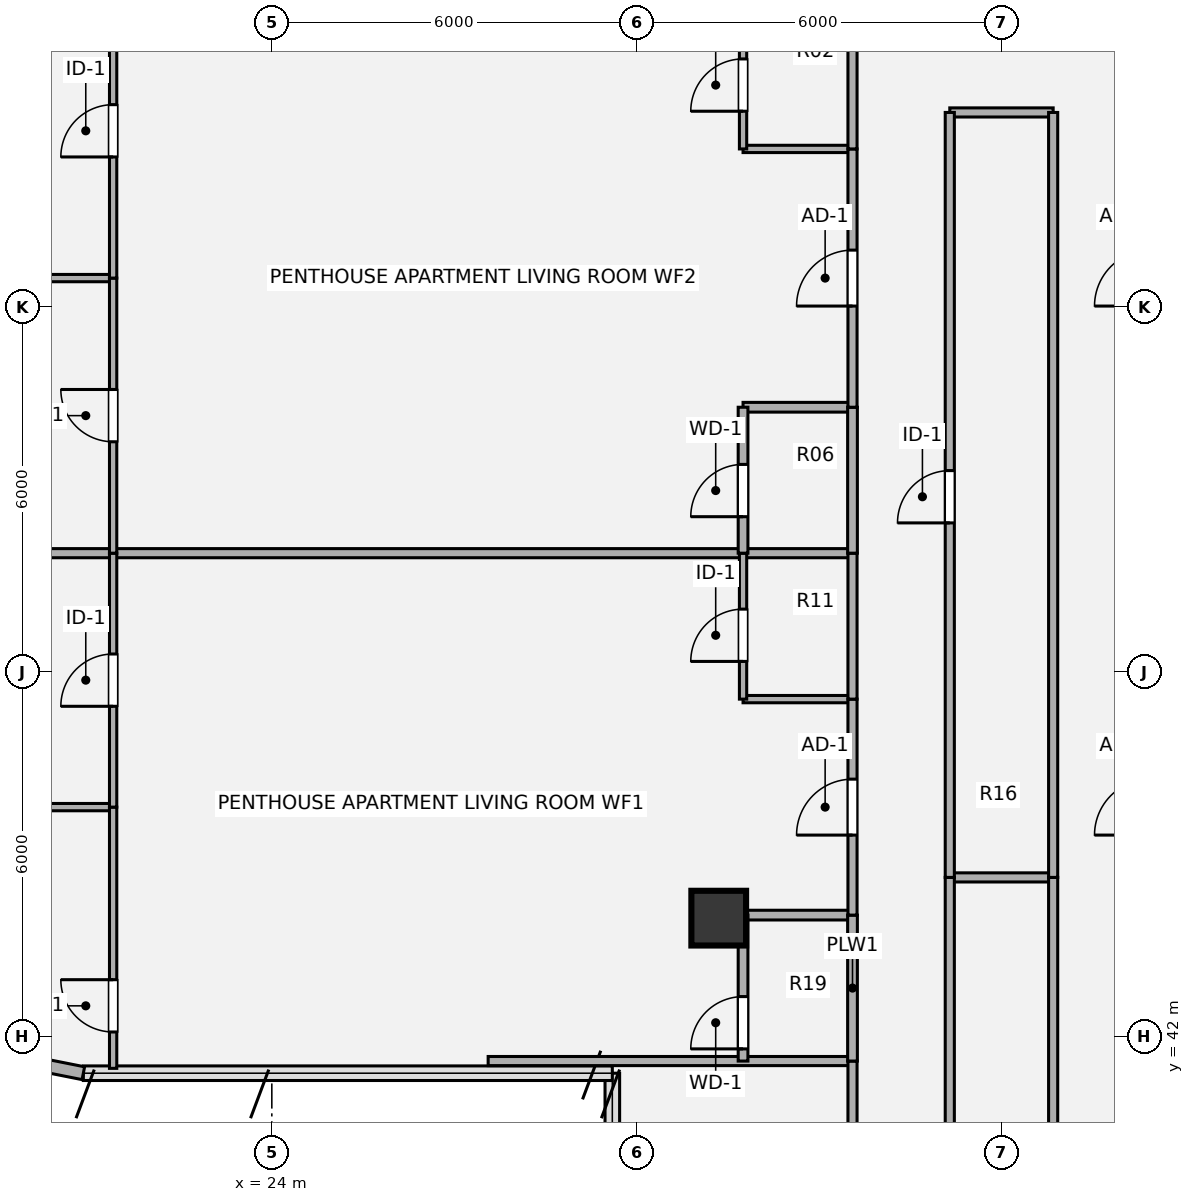
"""IFC4 building model, lengths in metres.
Left out: names, types, materials, properties, quantities, classifications, styles, units other than length and angle.
Written with IfcOpenShell. Run it as: python <this file> out.ifc"""

import sys

from ifc_helpers import new_model, si_unit, direction, frame, frame_2d, origin, origin_2d, place, context, subcontext, project, spatial, rectangle, hollow_circle, extrude, source, transform, mapped, element, fill, save


model = new_model("IFC4")
c1 = context("Model", 3, precision=1e-05, world=origin(), true_north=direction((0.0, 1.0)))
c2 = subcontext(c1, "Body", "Model", "MODEL_VIEW")
j1 = project(units=[si_unit("LENGTHUNIT", "METRE"), si_unit("PLANEANGLEUNIT", "RADIAN")], contexts=[c1])
p1 = place(None, origin())
s1 = spatial("IfcSite", under=j1, at=p1, CompositionType="ELEMENT")
p2 = place(p1, origin())
s2 = spatial("IfcBuilding", under=s1, at=p2, CompositionType="ELEMENT")
p3 = place(p2, frame((0.0, 0.0, 230.58)))
s3 = spatial("IfcBuildingStorey", under=s2, at=p3, CompositionType="ELEMENT", Elevation=230.58)
m1 = source(origin(), c2, "Body", "SweptSolid", [
    extrude(hollow_circle(Radius=0.45, WallThickness=0.032, at=origin_2d()), origin(), (0.0, 0.0, 1.0), 3.78),
])
p4 = place(p3, frame((31.35, 43.95, 0.0), z_axis=(0.0, 0.0, 1.0), x_axis=(1.0, 0.0, 0.0)))
e1 = element("IfcColumn", 1, at=p4, inside=s3, PredefinedType="COLUMN", context=c2, shape_type="MappedRepresentation", body=[
    mapped(m1, transform((0.0, 0.0, 0.0), x_axis=(1.0, 0.0, 0.0), y_axis=(0.0, 1.0, 0.0), z_axis=(0.0, 0.0, 1.0), scale=1.0)),
])
p5 = place(p3, frame((20.9, 41.4, 0.0), z_axis=(0.0, 0.0, 1.0), x_axis=(-0.980775717779, 0.195138390419, 0.0)))
e2 = element("IfcWall", 2, at=p5, inside=s3, PredefinedType="SOLIDWALL", context=c2, shape_type="SweptSolid", body=[
    extrude(rectangle(XDim=1.249, YDim=0.215, at=frame_2d((0.624, 0.0))), origin(), (0.0, 0.0, 1.0), 3.53),
])
p6 = place(p3, frame((27.558, 41.6, 0.0), z_axis=(0.0, 0.0, 1.0), x_axis=(1.0, 0.0, 0.0)))
e3 = element("IfcWall", 3, at=p6, inside=s3, PredefinedType="PARTITIONING", context=c2, shape_type="SweptSolid", body=[
    extrude(rectangle(XDim=5.992, YDim=0.15, at=frame_2d((2.996, 0.0))), origin(), (0.0, 0.0, 1.0), 3.5),
])
p7 = place(p3, frame((31.75, 44.0, 0.0), z_axis=(0.0, 0.0, 1.0), x_axis=(1.0, 0.0, 0.0)))
e4 = element("IfcWall", 4, at=p7, inside=s3, PredefinedType="PLUMBINGWALL", context=c2, shape_type="SweptSolid", body=[
    extrude(rectangle(XDim=1.8, YDim=0.16, at=frame_2d((0.9, 0.0))), origin(), (0.0, 0.0, 1.0), 2.903),
])
p8 = place(p3, frame((35.15, 44.62, 0.0), z_axis=(0.0, 0.0, 1.0), x_axis=(1.0, 0.0, 0.0)))
e5 = element("IfcWall", 5, at=p8, inside=s3, PredefinedType="PARTITIONING", context=c2, shape_type="SweptSolid", body=[
    extrude(rectangle(XDim=1.7, YDim=0.15, at=frame_2d((0.85, 0.0))), origin(), (0.0, 0.0, 1.0), 3.259),
])
p9 = place(p3, frame((17.78, 45.776, 0.0), z_axis=(0.0, 0.0, 1.0), x_axis=(1.0, 0.0, 0.0)))
e6 = element("IfcWall", 6, at=p9, inside=s3, PredefinedType="PARTITIONING", context=c2, shape_type="SweptSolid", body=[
    extrude(rectangle(XDim=3.61, YDim=0.12, at=frame_2d((1.805, 0.0))), origin(), (0.0, 0.0, 1.0), 2.982),
])
p10 = place(p3, frame((31.75, 47.552, 0.0), z_axis=(0.0, 0.0, 1.0), x_axis=(1.0, 0.0, 0.0)))
e7 = element("IfcWall", 7, at=p10, inside=s3, PredefinedType="PARTITIONING", context=c2, shape_type="SweptSolid", body=[
    extrude(rectangle(XDim=1.8, YDim=0.12, at=frame_2d((0.9, 0.0))), origin(), (0.0, 0.0, 1.0), 3.259),
])
p11 = place(p3, frame((17.78, 49.952, 0.0), z_axis=(0.0, 0.0, 1.0), x_axis=(1.0, 0.0, 0.0)))
e8 = element("IfcWall", 8, at=p11, inside=s3, PredefinedType="PARTITIONING", context=c2, shape_type="SweptSolid", body=[
    extrude(rectangle(XDim=15.77, YDim=0.15, at=frame_2d((7.885, 0.0))), origin(), (0.0, 0.0, 1.0), 2.982),
])
p12 = place(p3, frame((31.75, 52.352, 0.0), z_axis=(0.0, 0.0, 1.0), x_axis=(1.0, 0.0, 0.0)))
e9 = element("IfcWall", 9, at=p12, inside=s3, PredefinedType="PLUMBINGWALL", context=c2, shape_type="SweptSolid", body=[
    extrude(rectangle(XDim=1.8, YDim=0.16, at=frame_2d((0.9, 0.0))), origin(), (0.0, 0.0, 1.0), 3.259),
])
p13 = place(p3, frame((17.78, 54.476, 0.0), z_axis=(0.0, 0.0, 1.0), x_axis=(1.0, 0.0, 0.0)))
e10 = element("IfcWall", 10, at=p13, inside=s3, PredefinedType="PARTITIONING", context=c2, shape_type="SweptSolid", body=[
    extrude(rectangle(XDim=3.61, YDim=0.12, at=frame_2d((1.805, 0.0))), origin(), (0.0, 0.0, 1.0), 2.903),
])
p14 = place(p3, frame((31.75, 56.6, 0.0), z_axis=(0.0, 0.0, 1.0), x_axis=(1.0, 0.0, 0.0)))
e11 = element("IfcWall", 11, at=p14, inside=s3, PredefinedType="PARTITIONING", context=c2, shape_type="SweptSolid", body=[
    extrude(rectangle(XDim=1.8, YDim=0.12, at=frame_2d((0.9, 0.0))), origin(), (0.0, 0.0, 1.0), 3.259),
])
p15 = place(p3, frame((35.15, 57.2, 0.0), z_axis=(0.0, 0.0, 1.0), x_axis=(1.0, 0.0, 0.0)))
e12 = element("IfcWall", 12, at=p15, inside=s3, PredefinedType="PARTITIONING", context=c2, shape_type="SweptSolid", body=[
    extrude(rectangle(XDim=1.7, YDim=0.15, at=frame_2d((0.85, 0.0))), origin(), (0.0, 0.0, 1.0), 3.308),
])
p16 = place(p3, frame((21.39, 41.48, 0.0), z_axis=(0.0, 0.0, 1.0), x_axis=(0.0, 1.0, 0.0)))
e13 = element("IfcWall", 13, at=p16, inside=s3, PredefinedType="PARTITIONING", context=c2, shape_type="SweptSolid", body=[
    extrude(rectangle(XDim=4.296, YDim=0.12, at=frame_2d((2.148, 0.0))), origin(), (0.0, 0.0, 1.0), 3.5),
])
p17 = place(p16, frame((0.598, 0.0, 0.0)))
e14 = element("IfcOpeningElement", 14, at=p17, cuts=e13, PredefinedType="OPENING", context=c2, shape_type="SweptSolid", body=[
    extrude(rectangle(XDim=0.86, YDim=2.1, at=origin_2d()), frame((0.43, 0.07, 1.05), z_axis=(0.0, -1.0, 0.0), x_axis=(1.0, 0.0, 0.0)), (0.0, 0.0, 1.0), 0.14),
])
p18 = place(p3, frame((21.39, 45.776, 0.0), z_axis=(0.0, 0.0, 1.0), x_axis=(0.0, 1.0, 0.0)))
e15 = element("IfcWall", 15, at=p18, inside=s3, PredefinedType="PARTITIONING", context=c2, shape_type="SweptSolid", body=[
    extrude(rectangle(XDim=4.176, YDim=0.12, at=frame_2d((2.088, 0.0))), origin(), (0.0, 0.0, 1.0), 3.5),
])
p19 = place(p18, frame((1.658, 0.0, 0.0)))
e16 = element("IfcOpeningElement", 16, at=p19, cuts=e15, PredefinedType="OPENING", context=c2, shape_type="SweptSolid", body=[
    extrude(rectangle(XDim=0.86, YDim=2.1, at=origin_2d()), frame((0.43, 0.07, 1.05), z_axis=(0.0, -1.0, 0.0), x_axis=(1.0, 0.0, 0.0)), (0.0, 0.0, 1.0), 0.14),
])
p20 = place(p3, frame((21.39, 49.952, 0.0), z_axis=(0.0, 0.0, 1.0), x_axis=(0.0, 1.0, 0.0)))
e17 = element("IfcWall", 17, at=p20, inside=s3, PredefinedType="PARTITIONING", context=c2, shape_type="SweptSolid", body=[
    extrude(rectangle(XDim=4.524, YDim=0.12, at=frame_2d((2.262, 0.0))), origin(), (0.0, 0.0, 1.0), 3.5),
])
p21 = place(p20, frame((1.832, 0.0, 0.0)))
e18 = element("IfcOpeningElement", 18, at=p21, cuts=e17, PredefinedType="OPENING", context=c2, shape_type="SweptSolid", body=[
    extrude(rectangle(XDim=0.86, YDim=2.1, at=origin_2d()), frame((0.43, 0.07, 1.05), z_axis=(0.0, -1.0, 0.0), x_axis=(1.0, 0.0, 0.0)), (0.0, 0.0, 1.0), 0.14),
])
p22 = place(p3, frame((21.39, 54.476, 0.0), z_axis=(0.0, 0.0, 1.0), x_axis=(0.0, 1.0, 0.0)))
e19 = element("IfcWall", 19, at=p22, inside=s3, PredefinedType="PARTITIONING", context=c2, shape_type="SweptSolid", body=[
    extrude(rectangle(XDim=4.844, YDim=0.12, at=frame_2d((2.422, 0.0))), origin(), (0.0, 0.0, 1.0), 3.5),
])
p23 = place(p22, frame((1.992, 0.0, 0.0)))
e20 = element("IfcOpeningElement", 20, at=p23, cuts=e19, PredefinedType="OPENING", context=c2, shape_type="SweptSolid", body=[
    extrude(rectangle(XDim=0.86, YDim=2.1, at=origin_2d()), frame((0.43, 0.07, 1.05), z_axis=(0.0, -1.0, 0.0), x_axis=(1.0, 0.0, 0.0)), (0.0, 0.0, 1.0), 0.14),
])
p24 = place(p3, frame((31.75, 41.6, 0.0), z_axis=(0.0, 0.0, 1.0), x_axis=(0.0, 1.0, 0.0)))
e21 = element("IfcWall", 21, at=p24, inside=s3, PredefinedType="PLUMBINGWALL", context=c2, shape_type="SweptSolid", body=[
    extrude(rectangle(XDim=2.4, YDim=0.16, at=frame_2d((1.2, 0.0))), origin(), (0.0, 0.0, 1.0), 3.5),
])
p25 = place(p24, frame((0.2, 0.0, 0.0)))
e22 = element("IfcOpeningElement", 22, at=p25, cuts=e21, PredefinedType="OPENING", context=c2, shape_type="SweptSolid", body=[
    extrude(rectangle(XDim=0.86, YDim=2.1, at=origin_2d()), frame((0.43, 0.09, 1.05), z_axis=(0.0, -1.0, 0.0), x_axis=(1.0, 0.0, 0.0)), (0.0, 0.0, 1.0), 0.18),
])
p26 = place(p3, frame((31.75, 47.552, 0.0), z_axis=(0.0, 0.0, 1.0), x_axis=(0.0, 1.0, 0.0)))
e23 = element("IfcWall", 23, at=p26, inside=s3, PredefinedType="PARTITIONING", context=c2, shape_type="SweptSolid", body=[
    extrude(rectangle(XDim=2.4, YDim=0.12, at=frame_2d((1.2, 0.0))), origin(), (0.0, 0.0, 1.0), 3.5),
])
p27 = place(p26, frame((0.62, 0.0, 0.0)))
e24 = element("IfcOpeningElement", 24, at=p27, cuts=e23, PredefinedType="OPENING", context=c2, shape_type="SweptSolid", body=[
    extrude(rectangle(XDim=0.86, YDim=2.1, at=origin_2d()), frame((0.43, 0.07, 1.05), z_axis=(0.0, -1.0, 0.0), x_axis=(1.0, 0.0, 0.0)), (0.0, 0.0, 1.0), 0.14),
])
p28 = place(p3, frame((31.75, 49.952, 0.0), z_axis=(0.0, 0.0, 1.0), x_axis=(0.0, 1.0, 0.0)))
e25 = element("IfcWall", 25, at=p28, inside=s3, PredefinedType="PLUMBINGWALL", context=c2, shape_type="SweptSolid", body=[
    extrude(rectangle(XDim=2.4, YDim=0.16, at=frame_2d((1.2, 0.0))), origin(), (0.0, 0.0, 1.0), 3.5),
])
p29 = place(p28, frame((0.6, 0.0, 0.0)))
e26 = element("IfcOpeningElement", 26, at=p29, cuts=e25, PredefinedType="OPENING", context=c2, shape_type="SweptSolid", body=[
    extrude(rectangle(XDim=0.86, YDim=2.1, at=origin_2d()), frame((0.43, 0.09, 1.05), z_axis=(0.0, -1.0, 0.0), x_axis=(1.0, 0.0, 0.0)), (0.0, 0.0, 1.0), 0.18),
])
p30 = place(p3, frame((31.75, 56.6, 0.0), z_axis=(0.0, 0.0, 1.0), x_axis=(0.0, 1.0, 0.0)))
e27 = element("IfcWall", 27, at=p30, inside=s3, PredefinedType="PARTITIONING", context=c2, shape_type="SweptSolid", body=[
    extrude(rectangle(XDim=2.4, YDim=0.12, at=frame_2d((1.2, 0.0))), origin(), (0.0, 0.0, 1.0), 3.5),
])
p31 = place(p30, frame((0.62, 0.0, 0.0)))
e28 = element("IfcOpeningElement", 28, at=p31, cuts=e27, PredefinedType="OPENING", context=c2, shape_type="SweptSolid", body=[
    extrude(rectangle(XDim=0.86, YDim=2.1, at=origin_2d()), frame((0.43, 0.07, 1.05), z_axis=(0.0, -1.0, 0.0), x_axis=(1.0, 0.0, 0.0)), (0.0, 0.0, 1.0), 0.14),
])
p32 = place(p3, frame((33.55, 21.2, 0.0), z_axis=(0.0, 0.0, 1.0), x_axis=(0.0, 1.0, 0.0)))
e29 = element("IfcWall", 29, at=p32, inside=s3, PredefinedType="PARTITIONING", context=c2, shape_type="SweptSolid", body=[
    extrude(rectangle(XDim=20.4, YDim=0.15, at=frame_2d((10.2, 0.0))), origin(), (0.0, 0.0, 1.0), 3.5),
])
p33 = place(p32, frame((9.64, 0.0, 0.0)))
e30 = element("IfcOpeningElement", 30, at=p33, cuts=e29, PredefinedType="OPENING", context=c2, shape_type="SweptSolid", body=[
    extrude(rectangle(XDim=0.86, YDim=2.1, at=origin_2d()), frame((0.43, 0.085, 1.05), z_axis=(0.0, -1.0, 0.0), x_axis=(1.0, 0.0, 0.0)), (0.0, 0.0, 1.0), 0.17),
])
p34 = place(p3, frame((33.55, 41.6, 0.0), z_axis=(0.0, 0.0, 1.0), x_axis=(0.0, 1.0, 0.0)))
e31 = element("IfcWall", 31, at=p34, inside=s3, PredefinedType="PLUMBINGWALL", context=c2, shape_type="SweptSolid", body=[
    extrude(rectangle(XDim=2.4, YDim=0.16, at=frame_2d((1.2, 0.0))), origin(), (0.0, 0.0, 1.0), 3.5),
])
p35 = place(p3, frame((33.55, 44.0, 0.0), z_axis=(0.0, 0.0, 1.0), x_axis=(0.0, 1.0, 0.0)))
e32 = element("IfcWall", 32, at=p35, inside=s3, PredefinedType="PARTITIONING", context=c2, shape_type="SweptSolid", body=[
    extrude(rectangle(XDim=3.552, YDim=0.15, at=frame_2d((1.776, 0.0))), origin(), (0.0, 0.0, 1.0), 3.5),
])
p36 = place(p35, frame((1.316, 0.0, 0.0)))
e33 = element("IfcOpeningElement", 33, at=p36, cuts=e32, PredefinedType="OPENING", context=c2, shape_type="SweptSolid", body=[
    extrude(rectangle(XDim=0.92, YDim=2.1, at=origin_2d()), frame((0.46, 0.085, 1.05), z_axis=(0.0, -1.0, 0.0), x_axis=(1.0, 0.0, 0.0)), (0.0, 0.0, 1.0), 0.17),
])
p37 = place(p3, frame((33.55, 47.552, 0.0), z_axis=(0.0, 0.0, 1.0), x_axis=(0.0, 1.0, 0.0)))
e34 = element("IfcWall", 34, at=p37, inside=s3, PredefinedType="PARTITIONING", context=c2, shape_type="SweptSolid", body=[
    extrude(rectangle(XDim=2.4, YDim=0.15, at=frame_2d((1.2, 0.0))), origin(), (0.0, 0.0, 1.0), 3.5),
])
p38 = place(p3, frame((33.55, 49.952, 0.0), z_axis=(0.0, 0.0, 1.0), x_axis=(0.0, 1.0, 0.0)))
e35 = element("IfcWall", 35, at=p38, inside=s3, PredefinedType="PLUMBINGWALL", context=c2, shape_type="SweptSolid", body=[
    extrude(rectangle(XDim=2.4, YDim=0.16, at=frame_2d((1.2, 0.0))), origin(), (0.0, 0.0, 1.0), 3.5),
])
p39 = place(p3, frame((33.55, 52.352, 0.0), z_axis=(0.0, 0.0, 1.0), x_axis=(0.0, 1.0, 0.0)))
e36 = element("IfcWall", 36, at=p39, inside=s3, PredefinedType="PARTITIONING", context=c2, shape_type="SweptSolid", body=[
    extrude(rectangle(XDim=4.248, YDim=0.15, at=frame_2d((2.124, 0.0))), origin(), (0.0, 0.0, 1.0), 3.5),
])
p40 = place(p39, frame((1.664, 0.0, 0.0)))
e37 = element("IfcOpeningElement", 37, at=p40, cuts=e36, PredefinedType="OPENING", context=c2, shape_type="SweptSolid", body=[
    extrude(rectangle(XDim=0.92, YDim=2.1, at=origin_2d()), frame((0.46, 0.085, 1.05), z_axis=(0.0, -1.0, 0.0), x_axis=(1.0, 0.0, 0.0)), (0.0, 0.0, 1.0), 0.17),
])
p41 = place(p3, frame((33.55, 56.6, 0.0), z_axis=(0.0, 0.0, 1.0), x_axis=(0.0, 1.0, 0.0)))
e38 = element("IfcWall", 38, at=p41, inside=s3, PredefinedType="PARTITIONING", context=c2, shape_type="SweptSolid", body=[
    extrude(rectangle(XDim=2.4, YDim=0.15, at=frame_2d((1.2, 0.0))), origin(), (0.0, 0.0, 1.0), 3.5),
])
p42 = place(p3, frame((35.15, 25.2, 0.0), z_axis=(0.0, 0.0, 1.0), x_axis=(0.0, 1.0, 0.0)))
e39 = element("IfcWall", 39, at=p42, inside=s3, PredefinedType="PARTITIONING", context=c2, shape_type="SweptSolid", body=[
    extrude(rectangle(XDim=19.42, YDim=0.15, at=frame_2d((9.71, 0.0))), origin(), (0.0, 0.0, 1.0), 3.5),
])
p43 = place(p3, frame((35.15, 44.62, 0.0), z_axis=(0.0, 0.0, 1.0), x_axis=(0.0, 1.0, 0.0)))
e40 = element("IfcWall", 40, at=p43, inside=s3, PredefinedType="PARTITIONING", context=c2, shape_type="SweptSolid", body=[
    extrude(rectangle(XDim=12.58, YDim=0.15, at=frame_2d((6.29, 0.0))), origin(), (0.0, 0.0, 1.0), 3.5),
])
p44 = place(p43, frame((5.83, 0.0, 0.0)))
e41 = element("IfcOpeningElement", 41, at=p44, cuts=e40, PredefinedType="OPENING", context=c2, shape_type="SweptSolid", body=[
    extrude(rectangle(XDim=0.86, YDim=2.1, at=origin_2d()), frame((0.43, 0.085, 1.05), z_axis=(0.0, -1.0, 0.0), x_axis=(1.0, 0.0, 0.0)), (0.0, 0.0, 1.0), 0.17),
])
p45 = place(p3, frame((36.85, 25.2, 0.0), z_axis=(0.0, 0.0, 1.0), x_axis=(0.0, 1.0, 0.0)))
e42 = element("IfcWall", 42, at=p45, inside=s3, PredefinedType="PARTITIONING", context=c2, shape_type="SweptSolid", body=[
    extrude(rectangle(XDim=19.42, YDim=0.15, at=frame_2d((9.71, 0.0))), origin(), (0.0, 0.0, 1.0), 3.5),
])
p46 = place(p45, frame((9.185, 0.0, 0.0)))
e43 = element("IfcOpeningElement", 43, at=p46, cuts=e42, PredefinedType="OPENING", context=c2, shape_type="SweptSolid", body=[
    extrude(rectangle(XDim=1.05, YDim=2.1, at=origin_2d()), frame((0.525, 0.085, 1.05), z_axis=(0.0, -1.0, 0.0), x_axis=(1.0, 0.0, 0.0)), (0.0, 0.0, 1.0), 0.17),
])
p47 = place(p3, frame((36.85, 44.62, 0.0), z_axis=(0.0, 0.0, 1.0), x_axis=(0.0, 1.0, 0.0)))
e44 = element("IfcWall", 44, at=p47, inside=s3, PredefinedType="PARTITIONING", context=c2, shape_type="SweptSolid", body=[
    extrude(rectangle(XDim=12.58, YDim=0.15, at=frame_2d((6.29, 0.0))), origin(), (0.0, 0.0, 1.0), 3.5),
])
m2 = source(origin(), c2, "Body", "SweptSolid", [
    extrude(rectangle(XDim=0.86, YDim=2.1, at=origin_2d()), frame((0.43, 0.025, 1.05), z_axis=(0.0, -1.0, 0.0), x_axis=(1.0, 0.0, 0.0)), (0.0, 0.0, 1.0), 0.05),
])
p48 = place(p17, origin())
e45 = element("IfcDoor", 45, at=p48, inside=s3, OperationType="SINGLE_SWING_RIGHT", PredefinedType="DOOR", context=c2, shape_type="MappedRepresentation", body=[
    mapped(m2, transform((0.0, 0.0, 0.0), x_axis=(1.0, 0.0, 0.0), y_axis=(0.0, 1.0, 0.0), z_axis=(0.0, 0.0, 1.0), scale=1.0)),
])
fill(e14, e45)
p49 = place(p19, origin())
e46 = element("IfcDoor", 46, at=p49, inside=s3, OperationType="SINGLE_SWING_LEFT", PredefinedType="DOOR", context=c2, shape_type="MappedRepresentation", body=[
    mapped(m2, transform((0.0, 0.0, 0.0), x_axis=(1.0, 0.0, 0.0), y_axis=(0.0, 1.0, 0.0), z_axis=(0.0, 0.0, 1.0), scale=1.0)),
])
fill(e16, e46)
p50 = place(p21, origin())
e47 = element("IfcDoor", 47, at=p50, inside=s3, OperationType="SINGLE_SWING_RIGHT", PredefinedType="DOOR", context=c2, shape_type="MappedRepresentation", body=[
    mapped(m2, transform((0.0, 0.0, 0.0), x_axis=(1.0, 0.0, 0.0), y_axis=(0.0, 1.0, 0.0), z_axis=(0.0, 0.0, 1.0), scale=1.0)),
])
fill(e18, e47)
p51 = place(p23, origin())
e48 = element("IfcDoor", 48, at=p51, inside=s3, OperationType="SINGLE_SWING_LEFT", PredefinedType="DOOR", context=c2, shape_type="MappedRepresentation", body=[
    mapped(m2, transform((0.0, 0.0, 0.0), x_axis=(1.0, 0.0, 0.0), y_axis=(0.0, 1.0, 0.0), z_axis=(0.0, 0.0, 1.0), scale=1.0)),
])
fill(e20, e48)
m3 = source(origin(), c2, "Body", "SweptSolid", [
    extrude(rectangle(XDim=0.86, YDim=2.1, at=origin_2d()), frame((0.43, 0.025, 1.05), z_axis=(0.0, -1.0, 0.0), x_axis=(1.0, 0.0, 0.0)), (0.0, 0.0, 1.0), 0.05),
])
p52 = place(p25, origin())
e49 = element("IfcDoor", 49, at=p52, inside=s3, OperationType="SINGLE_SWING_LEFT", PredefinedType="DOOR", context=c2, shape_type="MappedRepresentation", body=[
    mapped(m3, transform((0.0, 0.0, 0.0), x_axis=(1.0, 0.0, 0.0), y_axis=(0.0, 1.0, 0.0), z_axis=(0.0, 0.0, 1.0), scale=1.0)),
])
fill(e22, e49)
p53 = place(p27, origin())
e50 = element("IfcDoor", 50, at=p53, inside=s3, OperationType="SINGLE_SWING_LEFT", PredefinedType="DOOR", context=c2, shape_type="MappedRepresentation", body=[
    mapped(m2, transform((0.0, 0.0, 0.0), x_axis=(1.0, 0.0, 0.0), y_axis=(0.0, 1.0, 0.0), z_axis=(0.0, 0.0, 1.0), scale=1.0)),
])
fill(e24, e50)
p54 = place(p29, origin())
e51 = element("IfcDoor", 51, at=p54, inside=s3, OperationType="SINGLE_SWING_LEFT", PredefinedType="DOOR", context=c2, shape_type="MappedRepresentation", body=[
    mapped(m3, transform((0.0, 0.0, 0.0), x_axis=(1.0, 0.0, 0.0), y_axis=(0.0, 1.0, 0.0), z_axis=(0.0, 0.0, 1.0), scale=1.0)),
])
fill(e26, e51)
p55 = place(p31, origin())
e52 = element("IfcDoor", 52, at=p55, inside=s3, OperationType="SINGLE_SWING_LEFT", PredefinedType="DOOR", context=c2, shape_type="MappedRepresentation", body=[
    mapped(m2, transform((0.0, 0.0, 0.0), x_axis=(1.0, 0.0, 0.0), y_axis=(0.0, 1.0, 0.0), z_axis=(0.0, 0.0, 1.0), scale=1.0)),
])
fill(e28, e52)
m4 = source(origin(), c2, "Body", "SweptSolid", [
    extrude(rectangle(XDim=0.92, YDim=2.1, at=origin_2d()), frame((0.46, 0.025, 1.05), z_axis=(0.0, -1.0, 0.0), x_axis=(1.0, 0.0, 0.0)), (0.0, 0.0, 1.0), 0.05),
])
p56 = place(p36, origin())
e53 = element("IfcDoor", 53, at=p56, inside=s3, OperationType="SINGLE_SWING_LEFT", PredefinedType="DOOR", context=c2, shape_type="MappedRepresentation", body=[
    mapped(m4, transform((0.0, 0.0, 0.0), x_axis=(1.0, 0.0, 0.0), y_axis=(0.0, 1.0, 0.0), z_axis=(0.0, 0.0, 1.0), scale=1.0)),
])
fill(e33, e53)
p57 = place(p40, origin())
e54 = element("IfcDoor", 54, at=p57, inside=s3, OperationType="SINGLE_SWING_LEFT", PredefinedType="DOOR", context=c2, shape_type="MappedRepresentation", body=[
    mapped(m4, transform((0.0, 0.0, 0.0), x_axis=(1.0, 0.0, 0.0), y_axis=(0.0, 1.0, 0.0), z_axis=(0.0, 0.0, 1.0), scale=1.0)),
])
fill(e37, e54)
p58 = place(p44, origin())
e55 = element("IfcDoor", 55, at=p58, inside=s3, OperationType="SINGLE_SWING_LEFT", PredefinedType="DOOR", context=c2, shape_type="MappedRepresentation", body=[
    mapped(m2, transform((0.0, 0.0, 0.0), x_axis=(1.0, 0.0, 0.0), y_axis=(0.0, 1.0, 0.0), z_axis=(0.0, 0.0, 1.0), scale=1.0)),
])
fill(e41, e55)
save(model, sys.argv[1])
